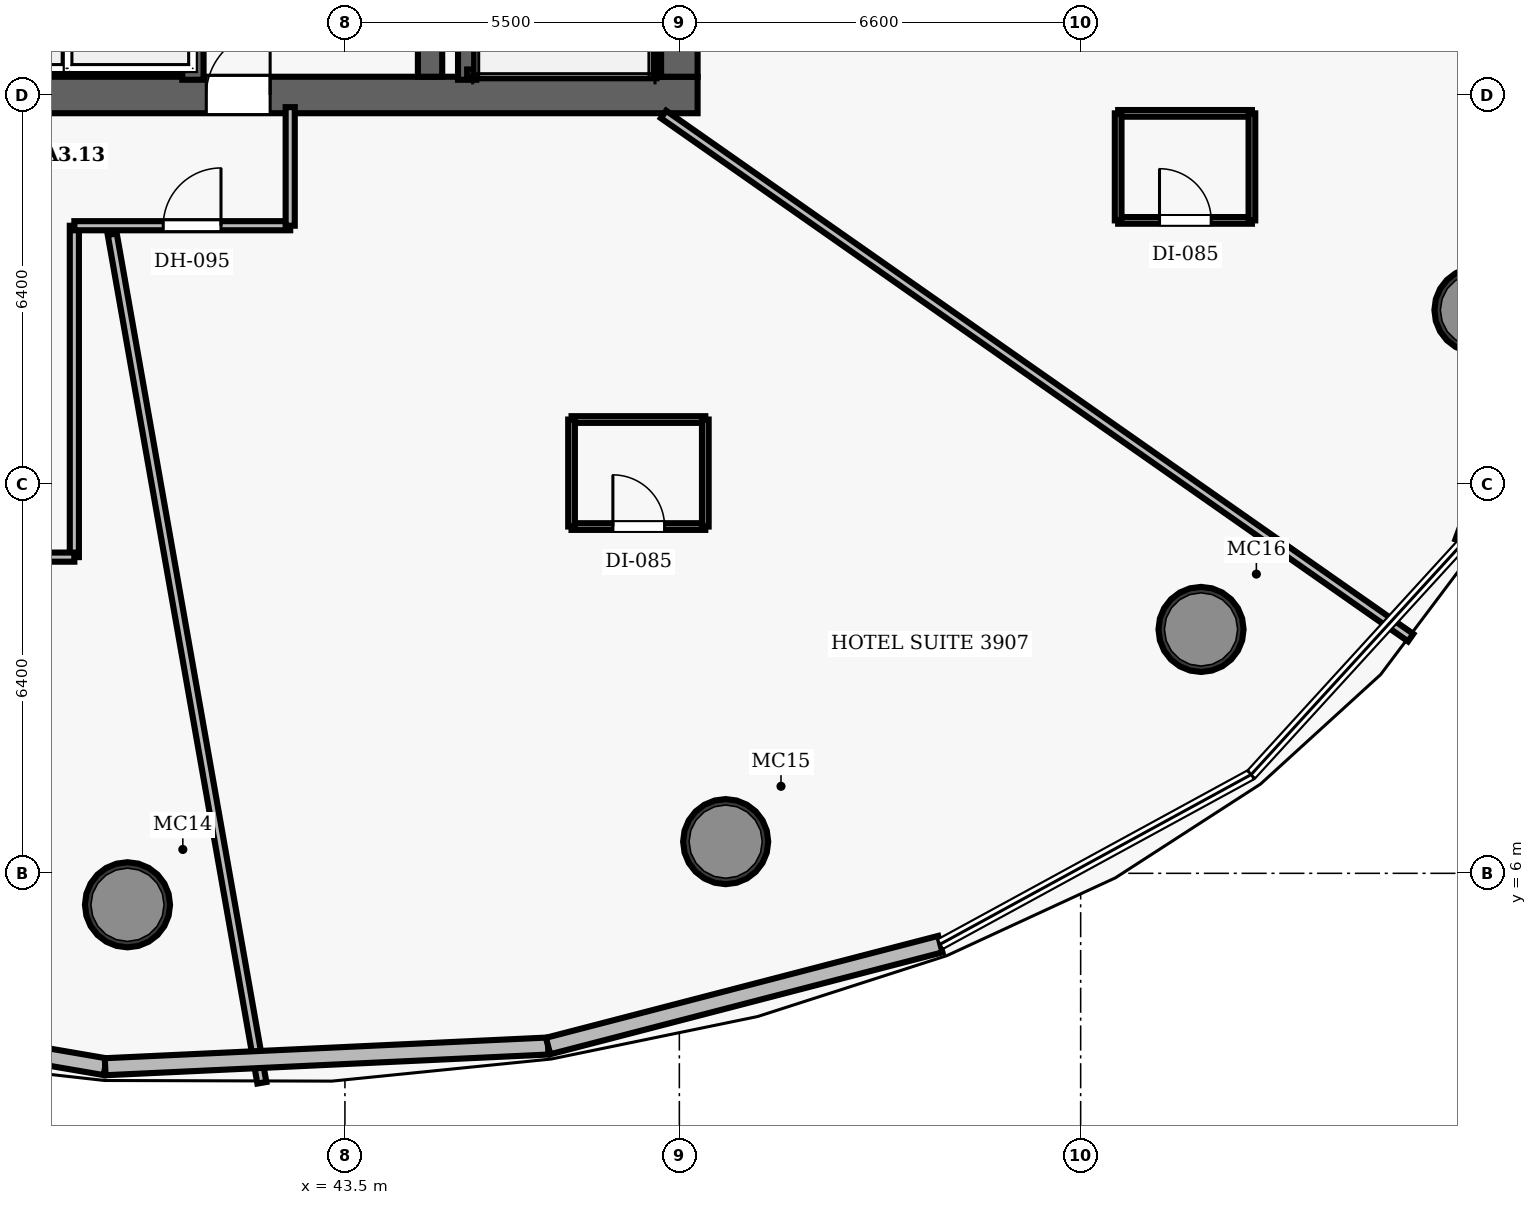
"""IFC4 building model, lengths in metres.
Left out: names, types, materials, properties, quantities, classifications, styles, units other than length and angle.
Written with IfcOpenShell. Run it as: python <this file> out.ifc"""

import sys

from ifc_helpers import new_model, si_unit, direction, frame, frame_2d, origin, origin_2d, place, context, subcontext, project, spatial, rectangle, hollow_circle, extrude, element, fill, save


model = new_model("IFC4")
c1 = context("Model", 3, precision=1e-05, world=origin(), true_north=direction((0.0, 1.0)))
c2 = subcontext(c1, "Body", "Model", "MODEL_VIEW")
j1 = project(units=[si_unit("LENGTHUNIT", "METRE"), si_unit("PLANEANGLEUNIT", "RADIAN")], contexts=[c1])
p1 = place(None, origin())
s1 = spatial("IfcSite", under=j1, at=p1, CompositionType="ELEMENT")
p2 = place(p1, origin())
s2 = spatial("IfcBuilding", under=s1, at=p2, CompositionType="ELEMENT")
p3 = place(p2, frame((0.0, 0.0, 155.3)))
s3 = spatial("IfcBuildingStorey", under=s2, at=p3, CompositionType="ELEMENT", Elevation=155.3)
p4 = place(p3, frame((26.7, 18.8, 0.0), z_axis=(0.0, 0.0, 1.0), x_axis=(1.0, 0.0, 0.0)))
e1 = element("IfcWall", 1, at=p4, inside=s3, PredefinedType="SHEAR", context=c2, shape_type="SweptSolid", body=[
    extrude(rectangle(XDim=22.6, YDim=0.6, at=frame_2d((11.3, 0.0))), origin(), (0.0, 0.0, 1.0), 3.5),
])
p5 = place(p4, frame((14.52, 0.0, 0.0)))
e2 = element("IfcOpeningElement", 2, at=p5, cuts=e1, PredefinedType="OPENING", context=c2, shape_type="SweptSolid", body=[
    extrude(rectangle(XDim=1.05, YDim=2.15, at=frame_2d((0.525, 1.075))), frame((0.0, 0.31, 0.0), z_axis=(0.0, -1.0, 0.0), x_axis=(1.0, 0.0, 0.0)), (0.0, 0.0, 1.0), 0.62),
])
p6 = place(p3, frame((49.0, 19.1, 0.0), z_axis=(0.0, 0.0, 1.0), x_axis=(0.0, 1.0, 0.0)))
e3 = element("IfcWall", 3, at=p6, inside=s3, PredefinedType="SHEAR", context=c2, shape_type="SweptSolid", body=[
    extrude(rectangle(XDim=13.8, YDim=0.6, at=frame_2d((6.9, 0.0))), origin(), (0.0, 0.0, 1.0), 3.5),
])
p7 = place(p6, frame((8.2, 0.0, 0.0)))
e4 = element("IfcOpeningElement", 4, at=p7, cuts=e3, PredefinedType="OPENING", context=c2, shape_type="SweptSolid", body=[
    extrude(rectangle(XDim=1.05, YDim=2.15, at=frame_2d((0.525, 1.075))), frame((0.0, 0.31, 0.0), z_axis=(0.0, -1.0, 0.0), x_axis=(1.0, 0.0, 0.0)), (0.0, 0.0, 1.0), 0.62),
])
p8 = place(p3, frame((44.9, 19.1, 0.0), z_axis=(0.0, 0.0, 1.0), x_axis=(0.0, 1.0, 0.0)))
e5 = element("IfcWall", 5, at=p8, inside=s3, PredefinedType="SHEAR", context=c2, shape_type="SweptSolid", body=[
    extrude(rectangle(XDim=13.8, YDim=0.4, at=frame_2d((6.9, 0.0))), origin(), (0.0, 0.0, 1.0), 3.5),
])
for number, where, z_axis, x_axis in (
    (6, (62.118, 15.262, 0.0), (0.0, 0.0, 1.0), (1.0, 0.0, 0.0)),
    (7, (39.924, 5.483, 0.0), (0.0, 0.0, 1.0), (1.0, 0.0, 0.0)),
    (8, (49.762, 6.521, 0.0), (0.0, 0.0, 1.0), (1.0, 0.0, 0.0)),
    (9, (57.58, 10.011, 0.0), (0.0, 0.0, 1.0), (1.0, 0.0, 0.0)),
):
    element("IfcColumn", number, at=place(p3, frame(where, z_axis=z_axis, x_axis=x_axis)), inside=s3, PredefinedType="COLUMN", context=c2, shape_type="SweptSolid", body=[
        extrude(hollow_circle(Radius=0.7, WallThickness=0.055, at=origin_2d()), origin(), (0.0, 0.0, 1.0), 3.5),
    ])
p9 = place(p3, frame((45.51, 19.05, 0.0), z_axis=(0.0, 0.0, 1.0), x_axis=(0.0, 1.0, 0.0)))
e10 = element("IfcWall", 10, at=p9, inside=s3, PredefinedType="SHEAR", context=c2, shape_type="SweptSolid", body=[
    extrude(rectangle(XDim=7.5, YDim=0.3, at=frame_2d((3.75, 0.0))), origin(), (0.0, 0.0, 1.0), 3.5),
])
p10 = place(p3, frame((48.605, 19.1, 0.0), z_axis=(0.0, 0.0, 1.0), x_axis=(0.0, 1.0, 0.0)))
e11 = element("IfcWall", 11, at=p10, inside=s3, PredefinedType="SHEAR", context=c2, shape_type="SweptSolid", body=[
    extrude(rectangle(XDim=7.45, YDim=0.12, at=frame_2d((3.725, 0.0))), origin(), (0.0, 0.0, 1.0), 3.5),
])
p11 = place(p3, frame((45.51, 19.16, 0.0), z_axis=(0.0, 0.0, 1.0), x_axis=(1.0, 0.0, 0.0)))
e12 = element("IfcWall", 12, at=p11, inside=s3, PredefinedType="SHEAR", context=c2, shape_type="SweptSolid", body=[
    extrude(rectangle(XDim=3.095, YDim=0.12, at=frame_2d((1.547, 0.0))), origin(), (0.0, 0.0, 1.0), 3.5),
])
p12 = place(p3, frame((41.0, 19.05, 0.0), z_axis=(0.0, 0.0, 1.0), x_axis=(0.0, 1.0, 0.0)))
e13 = element("IfcWall", 13, at=p12, inside=s3, PredefinedType="SHEAR", context=c2, shape_type="SweptSolid", body=[
    extrude(rectangle(XDim=2.08, YDim=0.35, at=frame_2d((1.04, 0.0))), origin(), (0.0, 0.0, 1.0), 2.675),
])
p13 = place(p3, frame((39.05, 11.2, 0.0), z_axis=(0.0, 0.0, 1.0), x_axis=(0.0, 1.0, 0.0)))
e14 = element("IfcWall", 14, at=p13, inside=s3, PredefinedType="PARTITIONING", context=c2, shape_type="SweptSolid", body=[
    extrude(rectangle(XDim=5.45, YDim=0.15, at=frame_2d((2.725, 0.0))), origin(), (0.0, 0.0, 1.0), 2.675),
])
p14 = place(p3, frame((39.05, 16.65, 0.0), z_axis=(0.0, 0.0, 1.0), x_axis=(1.0, 0.0, 0.0)))
e15 = element("IfcWall", 15, at=p14, inside=s3, PredefinedType="PARTITIONING", context=c2, shape_type="SweptSolid", body=[
    extrude(rectangle(XDim=3.55, YDim=0.15, at=frame_2d((1.775, 0.0))), origin(), (0.0, 0.0, 1.0), 2.675),
])
p15 = place(p14, frame((1.462, 0.0, 0.0)))
e16 = element("IfcOpeningElement", 16, at=p15, cuts=e15, PredefinedType="OPENING", context=c2, shape_type="SweptSolid", body=[
    extrude(rectangle(XDim=0.95, YDim=2.15, at=frame_2d((0.475, 1.075))), frame((0.0, 0.085, 0.0), z_axis=(0.0, -1.0, 0.0), x_axis=(1.0, 0.0, 0.0)), (0.0, 0.0, 1.0), 0.17),
])
p16 = place(p3, frame((42.6, 16.65, 0.0), z_axis=(0.0, 0.0, 1.0), x_axis=(0.0, 1.0, 0.0)))
e17 = element("IfcWall", 17, at=p16, inside=s3, PredefinedType="PARTITIONING", context=c2, shape_type="SweptSolid", body=[
    extrude(rectangle(XDim=1.95, YDim=0.15, at=frame_2d((0.975, 0.0))), origin(), (0.0, 0.0, 1.0), 2.675),
])
p17 = place(p3, frame((36.95, 11.2, 0.0), z_axis=(0.0, 0.0, 1.0), x_axis=(1.0, 0.0, 0.0)))
e18 = element("IfcWall", 18, at=p17, inside=s3, PredefinedType="PARTITIONING", context=c2, shape_type="SweptSolid", body=[
    extrude(rectangle(XDim=2.1, YDim=0.15, at=frame_2d((1.05, 0.0))), origin(), (0.0, 0.0, 1.0), 2.675),
])
p18 = place(p3, frame((39.673, 16.51, 0.0), z_axis=(0.0, 0.0, 1.0), x_axis=(0.173639863348, -0.984809219015, 0.0)))
e19 = element("IfcWall", 19, at=p18, inside=s3, PredefinedType="PARTITIONING", context=c2, shape_type="SweptSolid", body=[
    extrude(rectangle(XDim=14.17, YDim=0.15, at=frame_2d((7.085, 0.0))), origin(), (0.0, 0.0, 1.0), 2.675),
])
p19 = place(p3, frame((48.74, 18.48, 0.0), z_axis=(0.0, 0.0, 1.0), x_axis=(0.819145510829, -0.573585766986, 0.0)))
e20 = element("IfcWall", 20, at=p19, inside=s3, PredefinedType="PARTITIONING", context=c2, shape_type="SweptSolid", body=[
    extrude(rectangle(XDim=15.001, YDim=0.15, at=frame_2d((7.5, 0.0))), origin(), (0.0, 0.0, 1.0), 2.675),
])
p20 = place(p3, frame((47.227, 11.703, 0.0), z_axis=(0.0, 0.0, 1.0), x_axis=(1.0, 0.0, 0.0)))
e21 = element("IfcWall", 21, at=p20, inside=s3, PredefinedType="PARTITIONING", context=c2, shape_type="SweptSolid", body=[
    extrude(rectangle(XDim=2.2, YDim=0.11, at=frame_2d((1.1, 0.0))), origin(), (0.0, 0.0, 1.0), 2.675),
])
p21 = place(p20, frame((0.68, 0.0, 0.0)))
e22 = element("IfcOpeningElement", 22, at=p21, cuts=e21, PredefinedType="OPENING", context=c2, shape_type="SweptSolid", body=[
    extrude(rectangle(XDim=0.85, YDim=2.1, at=frame_2d((0.425, 1.05))), frame((0.0, 0.065, 0.0), z_axis=(0.0, -1.0, 0.0), x_axis=(1.0, 0.0, 0.0)), (0.0, 0.0, 1.0), 0.13),
])
p22 = place(p3, frame((47.227, 13.463, 0.0), z_axis=(0.0, 0.0, 1.0), x_axis=(1.0, 0.0, 0.0)))
e23 = element("IfcWall", 23, at=p22, inside=s3, PredefinedType="PARTITIONING", context=c2, shape_type="SweptSolid", body=[
    extrude(rectangle(XDim=2.2, YDim=0.11, at=frame_2d((1.1, 0.0))), origin(), (0.0, 0.0, 1.0), 2.675),
])
for number, where, z_axis, x_axis in (
    (24, (47.227, 11.703, 0.0), (0.0, 0.0, 1.0), (0.0, 1.0, 0.0)),
    (25, (49.427, 11.703, 0.0), (0.0, 0.0, 1.0), (0.0, 1.0, 0.0)),
):
    element("IfcWall", number, at=place(p3, frame(where, z_axis=z_axis, x_axis=x_axis)), inside=s3, PredefinedType="PARTITIONING", context=c2, shape_type="SweptSolid", body=[
        extrude(rectangle(XDim=1.76, YDim=0.11, at=frame_2d((0.88, 0.0))), origin(), (0.0, 0.0, 1.0), 2.675),
    ])
p23 = place(p3, frame((56.217, 16.738, 0.0), z_axis=(0.0, 0.0, 1.0), x_axis=(1.0, 0.0, 0.0)))
e26 = element("IfcWall", 26, at=p23, inside=s3, PredefinedType="PARTITIONING", context=c2, shape_type="SweptSolid", body=[
    extrude(rectangle(XDim=2.2, YDim=0.11, at=frame_2d((1.1, 0.0))), origin(), (0.0, 0.0, 1.0), 2.675),
])
p24 = place(p23, frame((0.68, 0.0, 0.0)))
e27 = element("IfcOpeningElement", 27, at=p24, cuts=e26, PredefinedType="OPENING", context=c2, shape_type="SweptSolid", body=[
    extrude(rectangle(XDim=0.85, YDim=2.1, at=frame_2d((0.425, 1.05))), frame((0.0, 0.065, 0.0), z_axis=(0.0, -1.0, 0.0), x_axis=(1.0, 0.0, 0.0)), (0.0, 0.0, 1.0), 0.13),
])
p25 = place(p3, frame((56.217, 18.498, 0.0), z_axis=(0.0, 0.0, 1.0), x_axis=(1.0, 0.0, 0.0)))
e28 = element("IfcWall", 28, at=p25, inside=s3, PredefinedType="PARTITIONING", context=c2, shape_type="SweptSolid", body=[
    extrude(rectangle(XDim=2.2, YDim=0.11, at=frame_2d((1.1, 0.0))), origin(), (0.0, 0.0, 1.0), 2.675),
])
for number, where, z_axis, x_axis in (
    (29, (56.217, 16.738, 0.0), (0.0, 0.0, 1.0), (0.0, 1.0, 0.0)),
    (30, (58.417, 16.738, 0.0), (0.0, 0.0, 1.0), (0.0, 1.0, 0.0)),
):
    element("IfcWall", number, at=place(p3, frame(where, z_axis=z_axis, x_axis=x_axis)), inside=s3, PredefinedType="PARTITIONING", context=c2, shape_type="SweptSolid", body=[
        extrude(rectangle(XDim=1.76, YDim=0.11, at=frame_2d((0.88, 0.0))), origin(), (0.0, 0.0, 1.0), 2.675),
    ])
p26 = place(p3, frame((63.688, 16.297, 0.0), z_axis=(0.0, 0.0, 1.0), x_axis=(-0.346470541845, -0.938060852842, 0.0)))
e31 = element("IfcWall", 31, at=p26, inside=s3, PredefinedType="SOLIDWALL", context=c2, shape_type="SweptSolid", body=[
    extrude(rectangle(XDim=5.174, YDim=0.28, at=frame_2d((2.587, 0.0))), origin(), (0.0, 0.0, 1.0), 3.26),
])
p27 = place(p3, frame((39.557, 2.82, 0.0), z_axis=(0.0, 0.0, 1.0), x_axis=(-0.985558648747, 0.169334432057, 0.0)))
e32 = element("IfcWall", 32, at=p27, inside=s3, PredefinedType="SOLIDWALL", context=c2, shape_type="SweptSolid", body=[
    extrude(rectangle(XDim=7.569, YDim=0.28, at=frame_2d((3.785, 0.0))), origin(), (0.0, 0.0, 1.0), 3.26),
])
p28 = place(p3, frame((46.841, 3.16, 0.0), z_axis=(0.0, 0.0, 1.0), x_axis=(-0.998910234394, -0.0466727289, 0.0)))
e33 = element("IfcWall", 33, at=p28, inside=s3, PredefinedType="SOLIDWALL", context=c2, shape_type="SweptSolid", body=[
    extrude(rectangle(XDim=7.292, YDim=0.28, at=frame_2d((3.646, 0.0))), origin(), (0.0, 0.0, 1.0), 3.26),
])
p29 = place(p3, frame((53.292, 4.836, 0.0), z_axis=(0.0, 0.0, 1.0), x_axis=(-0.967875831239, -0.251428668419, 0.0)))
e34 = element("IfcWall", 34, at=p29, inside=s3, PredefinedType="SOLIDWALL", context=c2, shape_type="SweptSolid", body=[
    extrude(rectangle(XDim=6.665, YDim=0.28, at=frame_2d((3.333, 0.0))), origin(), (0.0, 0.0, 1.0), 3.26),
])
p30 = place(p5, origin())
e35 = element("IfcDoor", 35, at=p30, inside=s3, OperationType="SINGLE_SWING_RIGHT", PredefinedType="DOOR", context=c2, shape_type="SweptSolid", body=[
    extrude(rectangle(XDim=1.05, YDim=2.15, at=frame_2d((0.525, 1.075))), frame((0.0, 0.025, 0.0), z_axis=(0.0, -1.0, 0.0), x_axis=(1.0, 0.0, 0.0)), (0.0, 0.0, 1.0), 0.05),
])
fill(e2, e35)
p31 = place(p15, origin())
e36 = element("IfcDoor", 36, at=p31, inside=s3, OperationType="SINGLE_SWING_RIGHT", PredefinedType="DOOR", context=c2, shape_type="SweptSolid", body=[
    extrude(rectangle(XDim=0.95, YDim=2.15, at=frame_2d((0.475, 1.075))), frame((0.0, 0.025, 0.0), z_axis=(0.0, -1.0, 0.0), x_axis=(1.0, 0.0, 0.0)), (0.0, 0.0, 1.0), 0.05),
])
fill(e16, e36)
p32 = place(p21, origin())
e37 = element("IfcDoor", 37, at=p32, inside=s3, OperationType="SINGLE_SWING_LEFT", PredefinedType="DOOR", context=c2, shape_type="SweptSolid", body=[
    extrude(rectangle(XDim=0.85, YDim=2.1, at=frame_2d((0.425, 1.05))), frame((0.0, 0.025, 0.0), z_axis=(0.0, -1.0, 0.0), x_axis=(1.0, 0.0, 0.0)), (0.0, 0.0, 1.0), 0.05),
])
fill(e22, e37)
p33 = place(p24, origin())
e38 = element("IfcDoor", 38, at=p33, inside=s3, OperationType="SINGLE_SWING_LEFT", PredefinedType="DOOR", context=c2, shape_type="SweptSolid", body=[
    extrude(rectangle(XDim=0.85, YDim=2.1, at=frame_2d((0.425, 1.05))), frame((0.0, 0.025, 0.0), z_axis=(0.0, -1.0, 0.0), x_axis=(1.0, 0.0, 0.0)), (0.0, 0.0, 1.0), 0.05),
])
fill(e27, e38)
save(model, sys.argv[1])
